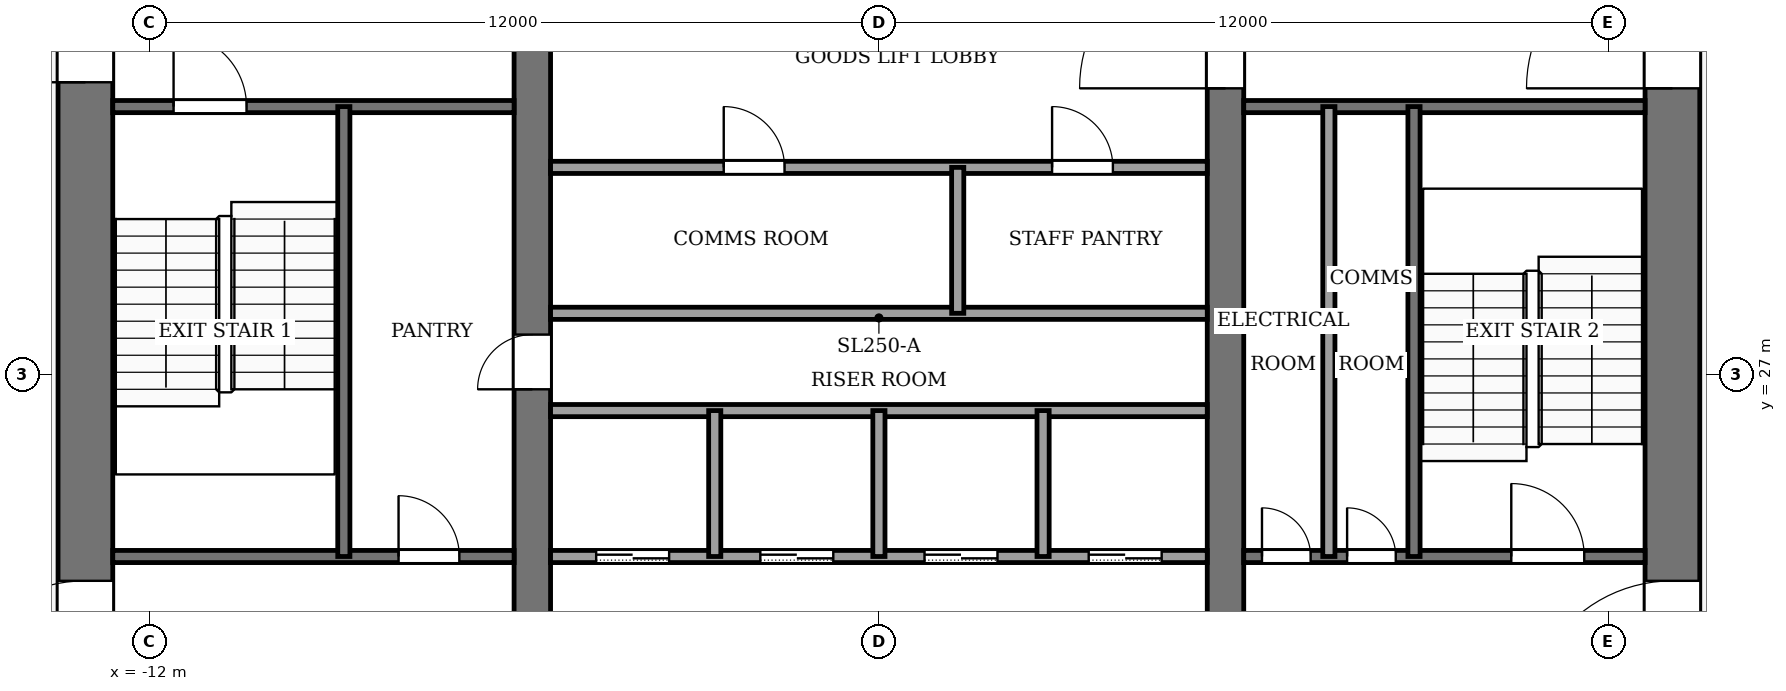
"""IFC4 building model, lengths in metres.
Left out: names, types, materials, properties, quantities, classifications, styles, units other than length and angle.
Written with IfcOpenShell. Run it as: python <this file> out.ifc"""

import sys

from ifc_helpers import new_model, si_unit, direction, frame, frame_2d, origin, place, context, subcontext, project, spatial, rectangle, extrude, element, fill, save


model = new_model("IFC4")
c1 = context("Model", 3, precision=1e-05, world=origin(), true_north=direction((0.0, 1.0)))
c2 = subcontext(c1, "Body", "Model", "MODEL_VIEW")
j1 = project(units=[si_unit("LENGTHUNIT", "METRE"), si_unit("PLANEANGLEUNIT", "RADIAN")], contexts=[c1])
p1 = place(None, origin())
s1 = spatial("IfcSite", under=j1, at=p1, CompositionType="ELEMENT")
p2 = place(p1, origin())
s2 = spatial("IfcBuilding", under=s1, at=p2, CompositionType="ELEMENT")
p3 = place(p2, frame((0.0, 0.0, 210.0)))
s3 = spatial("IfcBuildingStorey", under=s2, at=p3, CompositionType="ELEMENT", Elevation=210.0)
p4 = place(p3, frame((-13.05, 18.4, -0.13), z_axis=(0.0, 0.0, 1.0), x_axis=(0.0, 1.0, 0.0)))
e1 = element("IfcWall", 1, at=p4, inside=s3, PredefinedType="SHEAR", context=c2, shape_type="SweptSolid", body=[
    extrude(rectangle(XDim=19.2, YDim=0.9, at=frame_2d((9.6, 0.0))), origin(), (0.0, 0.0, 1.0), 4.0),
])
p5 = place(p4, frame((2.8, 0.0, 0.13)))
e2 = element("IfcOpeningElement", 2, at=p5, cuts=e1, PredefinedType="OPENING", context=c2, shape_type="SweptSolid", body=[
    extrude(rectangle(XDim=2.4, YDim=2.4, at=frame_2d((1.2, 1.2))), frame((0.0, 0.46, 0.0), z_axis=(0.0, -1.0, 0.0), x_axis=(1.0, 0.0, 0.0)), (0.0, 0.0, 1.0), 0.92),
])
p6 = place(p4, frame((13.4, 0.0, 0.13)))
e3 = element("IfcOpeningElement", 3, at=p6, cuts=e1, PredefinedType="OPENING", context=c2, shape_type="SweptSolid", body=[
    extrude(rectangle(XDim=1.4, YDim=2.2, at=frame_2d((0.7, 1.1))), frame((0.0, 0.46, 0.0), z_axis=(0.0, -1.0, 0.0), x_axis=(1.0, 0.0, 0.0)), (0.0, 0.0, 1.0), 0.92),
])
p7 = place(p3, frame((13.05, 18.4, -0.13), z_axis=(0.0, 0.0, 1.0), x_axis=(0.0, 1.0, 0.0)))
e4 = element("IfcWall", 4, at=p7, inside=s3, PredefinedType="SHEAR", context=c2, shape_type="SweptSolid", body=[
    extrude(rectangle(XDim=19.2, YDim=0.9, at=frame_2d((9.6, 0.0))), origin(), (0.0, 0.0, 1.0), 4.0),
])
p8 = place(p7, frame((2.8, 0.0, 0.13)))
e5 = element("IfcOpeningElement", 5, at=p8, cuts=e4, PredefinedType="OPENING", context=c2, shape_type="SweptSolid", body=[
    extrude(rectangle(XDim=2.4, YDim=2.4, at=frame_2d((1.2, 1.2))), frame((0.0, 0.46, 0.0), z_axis=(0.0, -1.0, 0.0), x_axis=(1.0, 0.0, 0.0)), (0.0, 0.0, 1.0), 0.92),
])
p9 = place(p7, frame((13.3, 0.0, 0.13)))
e6 = element("IfcOpeningElement", 6, at=p9, cuts=e4, PredefinedType="OPENING", context=c2, shape_type="SweptSolid", body=[
    extrude(rectangle(XDim=2.4, YDim=2.4, at=frame_2d((1.2, 1.2))), frame((0.0, 0.46, 0.0), z_axis=(0.0, -1.0, 0.0), x_axis=(1.0, 0.0, 0.0)), (0.0, 0.0, 1.0), 0.92),
])
p10 = place(p3, frame((-5.7, 18.4, -0.13), z_axis=(0.0, 0.0, 1.0), x_axis=(0.0, 1.0, 0.0)))
e7 = element("IfcWall", 7, at=p10, inside=s3, PredefinedType="SHEAR", context=c2, shape_type="SweptSolid", body=[
    extrude(rectangle(XDim=19.2, YDim=0.6, at=frame_2d((9.6, 0.0))), origin(), (0.0, 0.0, 1.0), 4.0),
])
p11 = place(p10, frame((8.35, 0.0, 0.13)))
e8 = element("IfcOpeningElement", 8, at=p11, cuts=e7, PredefinedType="OPENING", context=c2, shape_type="SweptSolid", body=[
    extrude(rectangle(XDim=0.9, YDim=2.1, at=frame_2d((0.45, 1.05))), frame((0.0, 0.31, 0.0), z_axis=(0.0, -1.0, 0.0), x_axis=(1.0, 0.0, 0.0)), (0.0, 0.0, 1.0), 0.62),
])
p12 = place(p3, frame((5.7, 18.4, -0.13), z_axis=(0.0, 0.0, 1.0), x_axis=(0.0, 1.0, 0.0)))
e9 = element("IfcWall", 9, at=p12, inside=s3, PredefinedType="SHEAR", context=c2, shape_type="SweptSolid", body=[
    extrude(rectangle(XDim=19.2, YDim=0.6, at=frame_2d((9.6, 0.0))), origin(), (0.0, 0.0, 1.0), 4.0),
])
p13 = place(p12, frame((13.3, 0.0, 0.13)))
e10 = element("IfcOpeningElement", 10, at=p13, cuts=e9, PredefinedType="OPENING", context=c2, shape_type="SweptSolid", body=[
    extrude(rectangle(XDim=2.4, YDim=2.4, at=frame_2d((1.2, 1.2))), frame((0.0, 0.31, 0.0), z_axis=(0.0, -1.0, 0.0), x_axis=(1.0, 0.0, 0.0)), (0.0, 0.0, 1.0), 0.62),
])
p14 = place(p3, frame((-12.6, 24.0, 0.0), z_axis=(0.0, 0.0, 1.0), x_axis=(1.0, 0.0, 0.0)))
e11 = element("IfcWall", 11, at=p14, inside=s3, PredefinedType="PARTITIONING", context=c2, shape_type="SweptSolid", body=[
    extrude(rectangle(XDim=6.6, YDim=0.2, at=frame_2d((3.3, 0.0))), origin(), (0.0, 0.0, 1.0), 3.87),
])
p15 = place(p14, frame((4.7, 0.0, 0.0)))
e12 = element("IfcOpeningElement", 12, at=p15, cuts=e11, PredefinedType="OPENING", context=c2, shape_type="SweptSolid", body=[
    extrude(rectangle(XDim=1.0, YDim=2.1, at=frame_2d((0.5, 1.05))), frame((0.0, 0.11, 0.0), z_axis=(0.0, -1.0, 0.0), x_axis=(1.0, 0.0, 0.0)), (0.0, 0.0, 1.0), 0.22),
])
p16 = place(p3, frame((-5.4, 24.0, 0.0), z_axis=(0.0, 0.0, 1.0), x_axis=(1.0, 0.0, 0.0)))
e13 = element("IfcWall", 13, at=p16, inside=s3, PredefinedType="PARTITIONING", context=c2, shape_type="SweptSolid", body=[
    extrude(rectangle(XDim=10.8, YDim=0.2, at=frame_2d((5.4, 0.0))), origin(), (0.0, 0.0, 1.0), 3.87),
])
p17 = place(p16, frame((0.75, 0.0, 0.0)))
e14 = element("IfcOpeningElement", 14, at=p17, cuts=e13, PredefinedType="OPENING", context=c2, shape_type="SweptSolid", body=[
    extrude(rectangle(XDim=1.2, YDim=2.2, at=frame_2d((0.6, 1.1))), frame((0.0, 0.11, 0.0), z_axis=(0.0, -1.0, 0.0), x_axis=(1.0, 0.0, 0.0)), (0.0, 0.0, 1.0), 0.22),
])
p18 = place(p16, frame((3.45, 0.0, 0.0)))
e15 = element("IfcOpeningElement", 15, at=p18, cuts=e13, PredefinedType="OPENING", context=c2, shape_type="SweptSolid", body=[
    extrude(rectangle(XDim=1.2, YDim=2.2, at=frame_2d((0.6, 1.1))), frame((0.0, 0.11, 0.0), z_axis=(0.0, -1.0, 0.0), x_axis=(1.0, 0.0, 0.0)), (0.0, 0.0, 1.0), 0.22),
])
p19 = place(p16, frame((6.15, 0.0, 0.0)))
e16 = element("IfcOpeningElement", 16, at=p19, cuts=e13, PredefinedType="OPENING", context=c2, shape_type="SweptSolid", body=[
    extrude(rectangle(XDim=1.2, YDim=2.2, at=frame_2d((0.6, 1.1))), frame((0.0, 0.11, 0.0), z_axis=(0.0, -1.0, 0.0), x_axis=(1.0, 0.0, 0.0)), (0.0, 0.0, 1.0), 0.22),
])
p20 = place(p16, frame((8.85, 0.0, 0.0)))
e17 = element("IfcOpeningElement", 17, at=p20, cuts=e13, PredefinedType="OPENING", context=c2, shape_type="SweptSolid", body=[
    extrude(rectangle(XDim=1.2, YDim=2.2, at=frame_2d((0.6, 1.1))), frame((0.0, 0.11, 0.0), z_axis=(0.0, -1.0, 0.0), x_axis=(1.0, 0.0, 0.0)), (0.0, 0.0, 1.0), 0.22),
])
p21 = place(p3, frame((6.0, 24.0, 0.0), z_axis=(0.0, 0.0, 1.0), x_axis=(1.0, 0.0, 0.0)))
e18 = element("IfcWall", 18, at=p21, inside=s3, PredefinedType="PARTITIONING", context=c2, shape_type="SweptSolid", body=[
    extrude(rectangle(XDim=6.6, YDim=0.2, at=frame_2d((3.3, 0.0))), origin(), (0.0, 0.0, 1.0), 3.87),
])
p22 = place(p21, frame((0.3, 0.0, 0.0)))
e19 = element("IfcOpeningElement", 19, at=p22, cuts=e18, PredefinedType="OPENING", context=c2, shape_type="SweptSolid", body=[
    extrude(rectangle(XDim=0.8, YDim=2.1, at=frame_2d((0.4, 1.05))), frame((0.0, 0.11, 0.0), z_axis=(0.0, -1.0, 0.0), x_axis=(1.0, 0.0, 0.0)), (0.0, 0.0, 1.0), 0.22),
])
p23 = place(p21, frame((1.7, 0.0, 0.0)))
e20 = element("IfcOpeningElement", 20, at=p23, cuts=e18, PredefinedType="OPENING", context=c2, shape_type="SweptSolid", body=[
    extrude(rectangle(XDim=0.8, YDim=2.1, at=frame_2d((0.4, 1.05))), frame((0.0, 0.11, 0.0), z_axis=(0.0, -1.0, 0.0), x_axis=(1.0, 0.0, 0.0)), (0.0, 0.0, 1.0), 0.22),
])
p24 = place(p21, frame((4.4, 0.0, 0.0)))
e21 = element("IfcOpeningElement", 21, at=p24, cuts=e18, PredefinedType="OPENING", context=c2, shape_type="SweptSolid", body=[
    extrude(rectangle(XDim=1.2, YDim=2.2, at=frame_2d((0.6, 1.1))), frame((0.0, 0.11, 0.0), z_axis=(0.0, -1.0, 0.0), x_axis=(1.0, 0.0, 0.0)), (0.0, 0.0, 1.0), 0.22),
])
for number, where, z_axis, x_axis in (
    (22, (-5.4, 26.4, 0.0), (0.0, 0.0, 1.0), (1.0, 0.0, 0.0)),
    (23, (-5.4, 28.0, 0.0), (0.0, 0.0, 1.0), (1.0, 0.0, 0.0)),
):
    element("IfcWall", number, at=place(p3, frame(where, z_axis=z_axis, x_axis=x_axis)), inside=s3, PredefinedType="PARTITIONING", context=c2, shape_type="SweptSolid", body=[
        extrude(rectangle(XDim=10.8, YDim=0.2, at=frame_2d((5.4, 0.0))), origin(), (0.0, 0.0, 1.0), 3.87),
    ])
p25 = place(p3, frame((-5.4, 30.4, 0.0), z_axis=(0.0, 0.0, 1.0), x_axis=(1.0, 0.0, 0.0)))
e24 = element("IfcWall", 24, at=p25, inside=s3, PredefinedType="PARTITIONING", context=c2, shape_type="SweptSolid", body=[
    extrude(rectangle(XDim=10.8, YDim=0.2, at=frame_2d((5.4, 0.0))), origin(), (0.0, 0.0, 1.0), 3.87),
])
p26 = place(p25, frame((2.848, 0.0, 0.0)))
e25 = element("IfcOpeningElement", 25, at=p26, cuts=e24, PredefinedType="OPENING", context=c2, shape_type="SweptSolid", body=[
    extrude(rectangle(XDim=1.0, YDim=2.1, at=frame_2d((0.5, 1.05))), frame((0.0, 0.11, 0.0), z_axis=(0.0, -1.0, 0.0), x_axis=(1.0, 0.0, 0.0)), (0.0, 0.0, 1.0), 0.22),
])
p27 = place(p25, frame((8.248, 0.0, 0.0)))
e26 = element("IfcOpeningElement", 26, at=p27, cuts=e24, PredefinedType="OPENING", context=c2, shape_type="SweptSolid", body=[
    extrude(rectangle(XDim=1.0, YDim=2.1, at=frame_2d((0.5, 1.05))), frame((0.0, 0.11, 0.0), z_axis=(0.0, -1.0, 0.0), x_axis=(1.0, 0.0, 0.0)), (0.0, 0.0, 1.0), 0.22),
])
p28 = place(p3, frame((-12.6, 31.4, 0.0), z_axis=(0.0, 0.0, 1.0), x_axis=(1.0, 0.0, 0.0)))
e27 = element("IfcWall", 27, at=p28, inside=s3, PredefinedType="PARTITIONING", context=c2, shape_type="SweptSolid", body=[
    extrude(rectangle(XDim=6.6, YDim=0.2, at=frame_2d((3.3, 0.0))), origin(), (0.0, 0.0, 1.0), 3.87),
])
p29 = place(p28, frame((1.0, 0.0, 0.0)))
e28 = element("IfcOpeningElement", 28, at=p29, cuts=e27, PredefinedType="OPENING", context=c2, shape_type="SweptSolid", body=[
    extrude(rectangle(XDim=1.2, YDim=2.2, at=frame_2d((0.6, 1.1))), frame((0.0, 0.11, 0.0), z_axis=(0.0, -1.0, 0.0), x_axis=(1.0, 0.0, 0.0)), (0.0, 0.0, 1.0), 0.22),
])
p30 = place(p3, frame((6.0, 31.4, 0.0), z_axis=(0.0, 0.0, 1.0), x_axis=(1.0, 0.0, 0.0)))
e29 = element("IfcWall", 29, at=p30, inside=s3, PredefinedType="PARTITIONING", context=c2, shape_type="SweptSolid", body=[
    extrude(rectangle(XDim=6.6, YDim=0.2, at=frame_2d((3.3, 0.0))), origin(), (0.0, 0.0, 1.0), 3.87),
])
p31 = place(p3, frame((-8.8, 24.0, 0.0), z_axis=(0.0, 0.0, 1.0), x_axis=(0.0, 1.0, 0.0)))
e30 = element("IfcWall", 30, at=p31, inside=s3, PredefinedType="PARTITIONING", context=c2, shape_type="SweptSolid", body=[
    extrude(rectangle(XDim=7.4, YDim=0.2, at=frame_2d((3.7, 0.0))), origin(), (0.0, 0.0, 1.0), 3.87),
])
for number, where, z_axis, x_axis in (
    (31, (-2.7, 24.0, 0.0), (0.0, 0.0, 1.0), (0.0, 1.0, 0.0)),
    (32, (0.0, 24.0, 0.0), (0.0, 0.0, 1.0), (0.0, 1.0, 0.0)),
    (33, (1.296, 28.0, 0.0), (0.0, 0.0, 1.0), (0.0, 1.0, 0.0)),
    (34, (2.7, 24.0, 0.0), (0.0, 0.0, 1.0), (0.0, 1.0, 0.0)),
):
    element("IfcWall", number, at=place(p3, frame(where, z_axis=z_axis, x_axis=x_axis)), inside=s3, PredefinedType="PARTITIONING", context=c2, shape_type="SweptSolid", body=[
        extrude(rectangle(XDim=2.4, YDim=0.2, at=frame_2d((1.2, 0.0))), origin(), (0.0, 0.0, 1.0), 3.87),
    ])
for number, where, z_axis, x_axis in (
    (35, (7.4, 24.0, 0.0), (0.0, 0.0, 1.0), (0.0, 1.0, 0.0)),
    (36, (8.8, 24.0, 0.0), (0.0, 0.0, 1.0), (0.0, 1.0, 0.0)),
):
    element("IfcWall", number, at=place(p3, frame(where, z_axis=z_axis, x_axis=x_axis)), inside=s3, PredefinedType="PARTITIONING", context=c2, shape_type="SweptSolid", body=[
        extrude(rectangle(XDim=7.4, YDim=0.2, at=frame_2d((3.7, 0.0))), origin(), (0.0, 0.0, 1.0), 3.87),
    ])
p32 = place(p17, origin())
e37 = element("IfcDoor", 37, at=p32, inside=s3, OperationType="SLIDING_TO_LEFT", PredefinedType="DOOR", context=c2, shape_type="SweptSolid", body=[
    extrude(rectangle(XDim=1.2, YDim=2.2, at=frame_2d((0.6, 1.1))), frame((0.0, 0.025, 0.0), z_axis=(0.0, -1.0, 0.0), x_axis=(1.0, 0.0, 0.0)), (0.0, 0.0, 1.0), 0.05),
])
fill(e14, e37)
p33 = place(p18, origin())
e38 = element("IfcDoor", 38, at=p33, inside=s3, OperationType="SLIDING_TO_LEFT", PredefinedType="DOOR", context=c2, shape_type="SweptSolid", body=[
    extrude(rectangle(XDim=1.2, YDim=2.2, at=frame_2d((0.6, 1.1))), frame((0.0, 0.025, 0.0), z_axis=(0.0, -1.0, 0.0), x_axis=(1.0, 0.0, 0.0)), (0.0, 0.0, 1.0), 0.05),
])
fill(e15, e38)
p34 = place(p19, origin())
e39 = element("IfcDoor", 39, at=p34, inside=s3, OperationType="SLIDING_TO_LEFT", PredefinedType="DOOR", context=c2, shape_type="SweptSolid", body=[
    extrude(rectangle(XDim=1.2, YDim=2.2, at=frame_2d((0.6, 1.1))), frame((0.0, 0.025, 0.0), z_axis=(0.0, -1.0, 0.0), x_axis=(1.0, 0.0, 0.0)), (0.0, 0.0, 1.0), 0.05),
])
fill(e16, e39)
p35 = place(p20, origin())
e40 = element("IfcDoor", 40, at=p35, inside=s3, OperationType="SLIDING_TO_LEFT", PredefinedType="DOOR", context=c2, shape_type="SweptSolid", body=[
    extrude(rectangle(XDim=1.2, YDim=2.2, at=frame_2d((0.6, 1.1))), frame((0.0, 0.025, 0.0), z_axis=(0.0, -1.0, 0.0), x_axis=(1.0, 0.0, 0.0)), (0.0, 0.0, 1.0), 0.05),
])
fill(e17, e40)
p36 = place(p26, origin())
e41 = element("IfcDoor", 41, at=p36, inside=s3, OperationType="SINGLE_SWING_LEFT", PredefinedType="DOOR", context=c2, shape_type="SweptSolid", body=[
    extrude(rectangle(XDim=1.0, YDim=2.1, at=frame_2d((0.5, 1.05))), frame((0.0, 0.025, 0.0), z_axis=(0.0, -1.0, 0.0), x_axis=(1.0, 0.0, 0.0)), (0.0, 0.0, 1.0), 0.05),
])
fill(e25, e41)
p37 = place(p27, origin())
e42 = element("IfcDoor", 42, at=p37, inside=s3, OperationType="SINGLE_SWING_RIGHT", PredefinedType="DOOR", context=c2, shape_type="SweptSolid", body=[
    extrude(rectangle(XDim=1.0, YDim=2.1, at=frame_2d((0.5, 1.05))), frame((0.0, 0.025, 0.0), z_axis=(0.0, -1.0, 0.0), x_axis=(1.0, 0.0, 0.0)), (0.0, 0.0, 1.0), 0.05),
])
fill(e26, e42)
p38 = place(p15, origin())
e43 = element("IfcDoor", 43, at=p38, inside=s3, OperationType="SINGLE_SWING_RIGHT", PredefinedType="DOOR", context=c2, shape_type="SweptSolid", body=[
    extrude(rectangle(XDim=1.0, YDim=2.1, at=frame_2d((0.5, 1.05))), frame((0.0, 0.025, 0.0), z_axis=(0.0, -1.0, 0.0), x_axis=(1.0, 0.0, 0.0)), (0.0, 0.0, 1.0), 0.05),
])
fill(e12, e43)
p39 = place(p22, origin())
e44 = element("IfcDoor", 44, at=p39, inside=s3, OperationType="SINGLE_SWING_RIGHT", PredefinedType="DOOR", context=c2, shape_type="SweptSolid", body=[
    extrude(rectangle(XDim=0.8, YDim=2.1, at=frame_2d((0.4, 1.05))), frame((0.0, 0.025, 0.0), z_axis=(0.0, -1.0, 0.0), x_axis=(1.0, 0.0, 0.0)), (0.0, 0.0, 1.0), 0.05),
])
fill(e19, e44)
p40 = place(p23, origin())
e45 = element("IfcDoor", 45, at=p40, inside=s3, OperationType="SINGLE_SWING_LEFT", PredefinedType="DOOR", context=c2, shape_type="SweptSolid", body=[
    extrude(rectangle(XDim=0.8, YDim=2.1, at=frame_2d((0.4, 1.05))), frame((0.0, 0.025, 0.0), z_axis=(0.0, -1.0, 0.0), x_axis=(1.0, 0.0, 0.0)), (0.0, 0.0, 1.0), 0.05),
])
fill(e20, e45)
p41 = place(p11, origin())
e46 = element("IfcDoor", 46, at=p41, inside=s3, OperationType="SINGLE_SWING_LEFT", PredefinedType="DOOR", context=c2, shape_type="SweptSolid", body=[
    extrude(rectangle(XDim=0.9, YDim=2.1, at=frame_2d((0.45, 1.05))), frame((0.0, 0.025, 0.0), z_axis=(0.0, -1.0, 0.0), x_axis=(1.0, 0.0, 0.0)), (0.0, 0.0, 1.0), 0.05),
])
fill(e8, e46)
p42 = place(p29, origin())
e47 = element("IfcDoor", 47, at=p42, inside=s3, OperationType="SINGLE_SWING_LEFT", PredefinedType="DOOR", context=c2, shape_type="SweptSolid", body=[
    extrude(rectangle(XDim=1.2, YDim=2.2, at=frame_2d((0.6, 1.1))), frame((0.0, 0.025, 0.0), z_axis=(0.0, -1.0, 0.0), x_axis=(1.0, 0.0, 0.0)), (0.0, 0.0, 1.0), 0.05),
])
fill(e28, e47)
p43 = place(p24, origin())
e48 = element("IfcDoor", 48, at=p43, inside=s3, OperationType="SINGLE_SWING_RIGHT", PredefinedType="DOOR", context=c2, shape_type="SweptSolid", body=[
    extrude(rectangle(XDim=1.2, YDim=2.2, at=frame_2d((0.6, 1.1))), frame((0.0, 0.025, 0.0), z_axis=(0.0, -1.0, 0.0), x_axis=(1.0, 0.0, 0.0)), (0.0, 0.0, 1.0), 0.05),
])
fill(e21, e48)
p44 = place(p13, origin())
e49 = element("IfcDoor", 49, at=p44, inside=s3, OperationType="DOUBLE_DOOR_SINGLE_SWING", PredefinedType="DOOR", context=c2, shape_type="SweptSolid", body=[
    extrude(rectangle(XDim=2.4, YDim=2.4, at=frame_2d((1.2, 1.2))), frame((0.0, 0.025, 0.0), z_axis=(0.0, -1.0, 0.0), x_axis=(1.0, 0.0, 0.0)), (0.0, 0.0, 1.0), 0.05),
])
fill(e10, e49)
p45 = place(p5, origin())
e50 = element("IfcDoor", 50, at=p45, inside=s3, OperationType="DOUBLE_DOOR_SINGLE_SWING", PredefinedType="DOOR", context=c2, shape_type="SweptSolid", body=[
    extrude(rectangle(XDim=2.4, YDim=2.4, at=frame_2d((1.2, 1.2))), frame((0.0, 0.025, 0.0), z_axis=(0.0, -1.0, 0.0), x_axis=(1.0, 0.0, 0.0)), (0.0, 0.0, 1.0), 0.05),
])
fill(e2, e50)
p46 = place(p8, origin())
e51 = element("IfcDoor", 51, at=p46, inside=s3, OperationType="DOUBLE_DOOR_SINGLE_SWING", PredefinedType="DOOR", context=c2, shape_type="SweptSolid", body=[
    extrude(rectangle(XDim=2.4, YDim=2.4, at=frame_2d((1.2, 1.2))), frame((0.0, 0.025, 0.0), z_axis=(0.0, -1.0, 0.0), x_axis=(1.0, 0.0, 0.0)), (0.0, 0.0, 1.0), 0.05),
])
fill(e5, e51)
p47 = place(p9, origin())
e52 = element("IfcDoor", 52, at=p47, inside=s3, OperationType="DOUBLE_DOOR_SINGLE_SWING", PredefinedType="DOOR", context=c2, shape_type="SweptSolid", body=[
    extrude(rectangle(XDim=2.4, YDim=2.4, at=frame_2d((1.2, 1.2))), frame((0.0, 0.025, 0.0), z_axis=(0.0, -1.0, 0.0), x_axis=(1.0, 0.0, 0.0)), (0.0, 0.0, 1.0), 0.05),
])
fill(e6, e52)
p48 = place(p6, origin())
e53 = element("IfcDoor", 53, at=p48, inside=s3, OperationType="SINGLE_SWING_LEFT", PredefinedType="DOOR", context=c2, shape_type="SweptSolid", body=[
    extrude(rectangle(XDim=1.4, YDim=2.2, at=frame_2d((0.7, 1.1))), frame((0.0, 0.025, 0.0), z_axis=(0.0, -1.0, 0.0), x_axis=(1.0, 0.0, 0.0)), (0.0, 0.0, 1.0), 0.05),
])
fill(e3, e53)
save(model, sys.argv[1])
